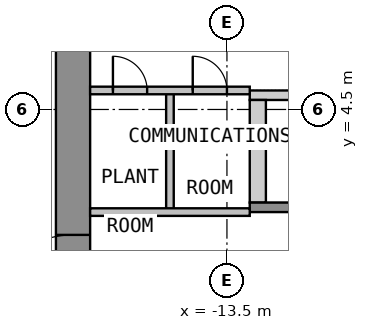
"""IFC4 building model, lengths in metres.
Left out: names, types, materials, properties, quantities, classifications, styles, units other than length and angle.
Written with IfcOpenShell. Run it as: python <this file> out.ifc"""

import sys

from ifc_helpers import new_model, si_unit, direction, frame, frame_2d, origin, place, context, subcontext, project, spatial, polyline, rectangle, outline, extrude, element, fill, save


model = new_model("IFC4")
c1 = context("Model", 3, precision=1e-05, world=origin(), true_north=direction((0.0, 1.0)))
c2 = subcontext(c1, "Body", "Model", "MODEL_VIEW")
j1 = project(units=[si_unit("LENGTHUNIT", "METRE"), si_unit("PLANEANGLEUNIT", "RADIAN")], contexts=[c1])
p1 = place(None, origin())
s1 = spatial("IfcSite", under=j1, at=p1, CompositionType="ELEMENT")
p2 = place(p1, origin())
s2 = spatial("IfcBuilding", under=s1, at=p2, CompositionType="ELEMENT")
p3 = place(p2, frame((0.0, 0.0, 15.6)))
s3 = spatial("IfcBuildingStorey", under=s2, at=p3, CompositionType="ELEMENT", Elevation=15.6)
p4 = place(p3, frame((-17.55, -12.6, 0.0), z_axis=(0.0, 0.0, 1.0), x_axis=(0.0, 1.0, 0.0)))
e1 = element("IfcWall", 1, at=p4, inside=s3, PredefinedType="SHEAR", context=c2, shape_type="SweptSolid", body=[
    extrude(rectangle(XDim=25.2, YDim=0.9, at=frame_2d((12.6, 0.0))), origin(), (0.0, 0.0, 1.0), 4.4),
])
p5 = place(p4, frame((11.4, 0.0, 0.0)))
e2 = element("IfcOpeningElement", 2, at=p5, cuts=e1, PredefinedType="OPENING", context=c2, shape_type="SweptSolid", body=[
    extrude(rectangle(XDim=2.4, YDim=2.1, at=frame_2d((1.2, 1.05))), frame((0.0, 0.46, 0.0), z_axis=(0.0, -1.0, 0.0), x_axis=(1.0, 0.0, 0.0)), (0.0, 0.0, 1.0), 0.92),
])
p6 = place(p3, origin())
e3 = element("IfcWall", 3, at=p6, inside=s3, PredefinedType="SHEAR", context=c2, shape_type="SweptSolid", body=[
    extrude(outline(polyline([(-12.9, 4.75), (12.9, 4.75), (12.9, 5.0), (-12.9, 5.0), (-12.9, 4.75)])), origin(), (0.0, 0.0, 1.0), 4.4),
])
p7 = place(p3, origin())
e4 = element("IfcWall", 4, at=p7, inside=s3, PredefinedType="SHEAR", context=c2, shape_type="SweptSolid", body=[
    extrude(outline(polyline([(-12.9, 2.05), (-12.475, 2.05), (-12.475, 4.75), (-12.9, 4.75), (-12.9, 2.05)])), origin(), (0.0, 0.0, 1.0), 4.4),
])
p8 = place(p3, frame((-12.9, 1.925, 0.0), z_axis=(0.0, 0.0, 1.0), x_axis=(1.0, 0.0, 0.0)))
e5 = element("IfcWall", 5, at=p8, inside=s3, PredefinedType="SHEAR", context=c2, shape_type="SweptSolid", body=[
    extrude(rectangle(XDim=25.8, YDim=0.25, at=frame_2d((12.9, 0.0))), origin(), (0.0, 0.0, 1.0), 4.4),
])
p9 = place(p8, frame((9.5, 0.0, 0.0)))
e6 = element("IfcOpeningElement", 6, at=p9, cuts=e5, PredefinedType="OPENING", context=c2, shape_type="SweptSolid", body=[
    extrude(rectangle(XDim=1.2, YDim=2.1, at=frame_2d((0.6, 1.05))), frame((0.0, 0.135, 0.0), z_axis=(0.0, -1.0, 0.0), x_axis=(1.0, 0.0, 0.0)), (0.0, 0.0, 1.0), 0.27),
])
p10 = place(p8, frame((12.3, 0.0, 0.0)))
e7 = element("IfcOpeningElement", 7, at=p10, cuts=e5, PredefinedType="OPENING", context=c2, shape_type="SweptSolid", body=[
    extrude(rectangle(XDim=1.2, YDim=2.1, at=frame_2d((0.6, 1.05))), frame((0.0, 0.135, 0.0), z_axis=(0.0, -1.0, 0.0), x_axis=(1.0, 0.0, 0.0)), (0.0, 0.0, 1.0), 0.27),
])
p11 = place(p8, frame((15.1, 0.0, 0.0)))
e8 = element("IfcOpeningElement", 8, at=p11, cuts=e5, PredefinedType="OPENING", context=c2, shape_type="SweptSolid", body=[
    extrude(rectangle(XDim=1.2, YDim=2.1, at=frame_2d((0.6, 1.05))), frame((0.0, 0.135, 0.0), z_axis=(0.0, -1.0, 0.0), x_axis=(1.0, 0.0, 0.0)), (0.0, 0.0, 1.0), 0.27),
])
p12 = place(p8, frame((17.9, 0.0, 0.0)))
e9 = element("IfcOpeningElement", 9, at=p12, cuts=e5, PredefinedType="OPENING", context=c2, shape_type="SweptSolid", body=[
    extrude(rectangle(XDim=1.2, YDim=2.1, at=frame_2d((0.6, 1.05))), frame((0.0, 0.135, 0.0), z_axis=(0.0, -1.0, 0.0), x_axis=(1.0, 0.0, 0.0)), (0.0, 0.0, 1.0), 0.27),
])
p13 = place(p8, frame((20.7, 0.0, 0.0)))
e10 = element("IfcOpeningElement", 10, at=p13, cuts=e5, PredefinedType="OPENING", context=c2, shape_type="SweptSolid", body=[
    extrude(rectangle(XDim=1.2, YDim=2.1, at=frame_2d((0.6, 1.05))), frame((0.0, 0.135, 0.0), z_axis=(0.0, -1.0, 0.0), x_axis=(1.0, 0.0, 0.0)), (0.0, 0.0, 1.0), 0.27),
])
p14 = place(p8, frame((23.5, 0.0, 0.0)))
e11 = element("IfcOpeningElement", 11, at=p14, cuts=e5, PredefinedType="OPENING", context=c2, shape_type="SweptSolid", body=[
    extrude(rectangle(XDim=1.2, YDim=2.1, at=frame_2d((0.6, 1.05))), frame((0.0, 0.135, 0.0), z_axis=(0.0, -1.0, 0.0), x_axis=(1.0, 0.0, 0.0)), (0.0, 0.0, 1.0), 0.27),
])
p15 = place(p3, frame((-15.0, 1.8, 0.0), z_axis=(0.0, 0.0, 1.0), x_axis=(0.0, 1.0, 0.0)))
e12 = element("IfcWall", 12, at=p15, inside=s3, PredefinedType="PARTITIONING", context=c2, shape_type="SweptSolid", body=[
    extrude(rectangle(XDim=3.2, YDim=0.2, at=frame_2d((1.6, 0.0))), origin(), (0.0, 0.0, 1.0), 4.4),
])
p16 = place(p3, frame((-17.1, 5.0, 0.0), z_axis=(0.0, 0.0, 1.0), x_axis=(1.0, 0.0, 0.0)))
e13 = element("IfcWall", 13, at=p16, inside=s3, PredefinedType="PARTITIONING", context=c2, shape_type="SweptSolid", body=[
    extrude(rectangle(XDim=4.2, YDim=0.2, at=frame_2d((2.1, 0.0))), origin(), (0.0, 0.0, 1.0), 4.4),
])
p17 = place(p16, frame((0.6, 0.0, 0.0)))
e14 = element("IfcOpeningElement", 14, at=p17, cuts=e13, PredefinedType="OPENING", context=c2, shape_type="SweptSolid", body=[
    extrude(rectangle(XDim=0.9, YDim=2.1, at=frame_2d((0.45, 1.05))), frame((0.0, 0.11, 0.0), z_axis=(0.0, -1.0, 0.0), x_axis=(1.0, 0.0, 0.0)), (0.0, 0.0, 1.0), 0.22),
])
p18 = place(p16, frame((2.7, 0.0, 0.0)))
e15 = element("IfcOpeningElement", 15, at=p18, cuts=e13, PredefinedType="OPENING", context=c2, shape_type="SweptSolid", body=[
    extrude(rectangle(XDim=0.9, YDim=2.1, at=frame_2d((0.45, 1.05))), frame((0.0, 0.11, 0.0), z_axis=(0.0, -1.0, 0.0), x_axis=(1.0, 0.0, 0.0)), (0.0, 0.0, 1.0), 0.22),
])
p19 = place(p3, frame((-17.1, 1.8, 0.0), z_axis=(0.0, 0.0, 1.0), x_axis=(1.0, 0.0, 0.0)))
e16 = element("IfcWall", 16, at=p19, inside=s3, PredefinedType="PARTITIONING", context=c2, shape_type="SweptSolid", body=[
    extrude(rectangle(XDim=4.2, YDim=0.2, at=frame_2d((2.1, 0.0))), origin(), (0.0, 0.0, 1.0), 4.4),
])
p20 = place(p5, origin())
e17 = element("IfcDoor", 17, at=p20, inside=s3, OperationType="DOUBLE_DOOR_DOUBLE_SWING", PredefinedType="DOOR", context=c2, shape_type="SweptSolid", body=[
    extrude(rectangle(XDim=2.4, YDim=2.1, at=frame_2d((1.2, 1.05))), frame((0.0, 0.025, 0.0), z_axis=(0.0, -1.0, 0.0), x_axis=(1.0, 0.0, 0.0)), (0.0, 0.0, 1.0), 0.05),
])
fill(e2, e17)
p21 = place(p17, origin())
e18 = element("IfcDoor", 18, at=p21, inside=s3, OperationType="SINGLE_SWING_LEFT", PredefinedType="DOOR", context=c2, shape_type="SweptSolid", body=[
    extrude(rectangle(XDim=0.9, YDim=2.1, at=frame_2d((0.45, 1.05))), frame((0.0, 0.025, 0.0), z_axis=(0.0, -1.0, 0.0), x_axis=(1.0, 0.0, 0.0)), (0.0, 0.0, 1.0), 0.05),
])
fill(e14, e18)
p22 = place(p18, origin())
e19 = element("IfcDoor", 19, at=p22, inside=s3, OperationType="SINGLE_SWING_LEFT", PredefinedType="DOOR", context=c2, shape_type="SweptSolid", body=[
    extrude(rectangle(XDim=0.9, YDim=2.1, at=frame_2d((0.45, 1.05))), frame((0.0, 0.025, 0.0), z_axis=(0.0, -1.0, 0.0), x_axis=(1.0, 0.0, 0.0)), (0.0, 0.0, 1.0), 0.05),
])
fill(e15, e19)
save(model, sys.argv[1])
